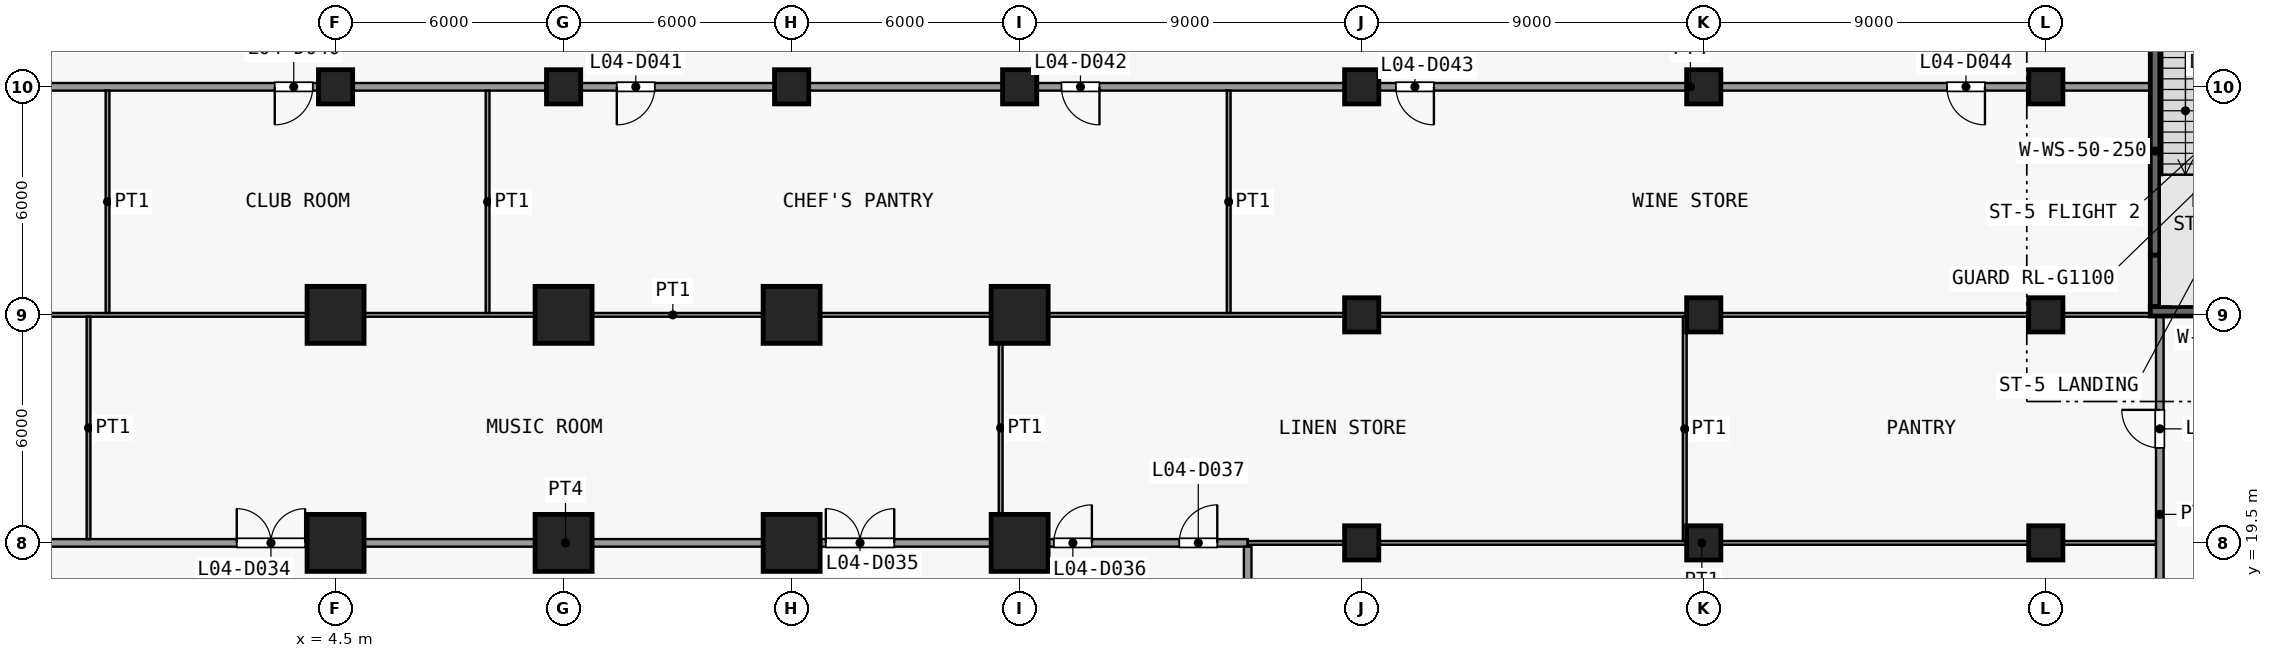
"""IFC4 building model, lengths in metres.
Left out: names, types, materials, properties, quantities, classifications, styles, units other than length and angle.
Written with IfcOpenShell. Run it as: python <this file> out.ifc"""

import sys

from ifc_helpers import new_model, si_unit, direction, frame, frame_2d, origin, origin_2d, place, context, subcontext, project, spatial, rectangle, extrude, element, fill, save


model = new_model("IFC4")
c1 = context("Model", 3, precision=1e-05, world=origin(), true_north=direction((0.0, 1.0)))
c2 = subcontext(c1, "Body", "Model", "MODEL_VIEW")
j1 = project(units=[si_unit("LENGTHUNIT", "METRE"), si_unit("PLANEANGLEUNIT", "RADIAN")], contexts=[c1])
p1 = place(None, origin())
s1 = spatial("IfcSite", under=j1, at=p1, CompositionType="ELEMENT")
p2 = place(p1, origin())
s2 = spatial("IfcBuilding", under=s1, at=p2, CompositionType="ELEMENT")
p3 = place(p2, frame((0.0, 0.0, 23.5)))
s3 = spatial("IfcBuildingStorey", under=s2, at=p3, CompositionType="ELEMENT", Elevation=23.5)
for number, where, z_axis, x_axis in (
    (1, (4.5, 19.5, 0.0), (0.0, 0.0, 1.0), (1.0, 0.0, 0.0)),
    (2, (4.5, 25.5, 0.0), (0.0, 0.0, 1.0), (1.0, 0.0, 0.0)),
):
    element("IfcColumn", number, at=place(p3, frame(where, z_axis=z_axis, x_axis=x_axis)), inside=s3, PredefinedType="COLUMN", context=c2, shape_type="SweptSolid", body=[
        extrude(rectangle(XDim=1.5, YDim=1.5, at=origin_2d()), origin(), (0.0, 0.0, 1.0), 4.5),
    ])
p4 = place(p3, frame((4.5, 31.5, 0.0), z_axis=(0.0, 0.0, 1.0), x_axis=(1.0, 0.0, 0.0)))
e3 = element("IfcColumn", 3, at=p4, inside=s3, PredefinedType="COLUMN", context=c2, shape_type="SweptSolid", body=[
    extrude(rectangle(XDim=0.9, YDim=0.9, at=origin_2d()), origin(), (0.0, 0.0, 1.0), 4.5),
])
for number, where, z_axis, x_axis in (
    (4, (10.5, 19.5, 0.0), (0.0, 0.0, 1.0), (1.0, 0.0, 0.0)),
    (5, (10.5, 25.5, 0.0), (0.0, 0.0, 1.0), (1.0, 0.0, 0.0)),
):
    element("IfcColumn", number, at=place(p3, frame(where, z_axis=z_axis, x_axis=x_axis)), inside=s3, PredefinedType="COLUMN", context=c2, shape_type="SweptSolid", body=[
        extrude(rectangle(XDim=1.5, YDim=1.5, at=origin_2d()), origin(), (0.0, 0.0, 1.0), 4.5),
    ])
p5 = place(p3, frame((10.5, 31.5, 0.0), z_axis=(0.0, 0.0, 1.0), x_axis=(1.0, 0.0, 0.0)))
e6 = element("IfcColumn", 6, at=p5, inside=s3, PredefinedType="COLUMN", context=c2, shape_type="SweptSolid", body=[
    extrude(rectangle(XDim=0.9, YDim=0.9, at=origin_2d()), origin(), (0.0, 0.0, 1.0), 4.5),
])
for number, where, z_axis, x_axis in (
    (7, (16.5, 19.5, 0.0), (0.0, 0.0, 1.0), (1.0, 0.0, 0.0)),
    (8, (16.5, 25.5, 0.0), (0.0, 0.0, 1.0), (1.0, 0.0, 0.0)),
):
    element("IfcColumn", number, at=place(p3, frame(where, z_axis=z_axis, x_axis=x_axis)), inside=s3, PredefinedType="COLUMN", context=c2, shape_type="SweptSolid", body=[
        extrude(rectangle(XDim=1.5, YDim=1.5, at=origin_2d()), origin(), (0.0, 0.0, 1.0), 4.5),
    ])
p6 = place(p3, frame((16.5, 31.5, 0.0), z_axis=(0.0, 0.0, 1.0), x_axis=(1.0, 0.0, 0.0)))
e9 = element("IfcColumn", 9, at=p6, inside=s3, PredefinedType="COLUMN", context=c2, shape_type="SweptSolid", body=[
    extrude(rectangle(XDim=0.9, YDim=0.9, at=origin_2d()), origin(), (0.0, 0.0, 1.0), 4.5),
])
for number, where, z_axis, x_axis in (
    (10, (22.5, 19.5, 0.0), (0.0, 0.0, 1.0), (1.0, 0.0, 0.0)),
    (11, (22.5, 25.5, 0.0), (0.0, 0.0, 1.0), (1.0, 0.0, 0.0)),
):
    element("IfcColumn", number, at=place(p3, frame(where, z_axis=z_axis, x_axis=x_axis)), inside=s3, PredefinedType="COLUMN", context=c2, shape_type="SweptSolid", body=[
        extrude(rectangle(XDim=1.5, YDim=1.5, at=origin_2d()), origin(), (0.0, 0.0, 1.0), 4.5),
    ])
for number, where, z_axis, x_axis in (
    (12, (22.5, 31.5, 0.0), (0.0, 0.0, 1.0), (1.0, 0.0, 0.0)),
    (13, (31.5, 19.5, 0.0), (0.0, 0.0, 1.0), (1.0, 0.0, 0.0)),
    (14, (31.5, 25.5, 0.0), (0.0, 0.0, 1.0), (1.0, 0.0, 0.0)),
    (15, (31.5, 31.5, 0.0), (0.0, 0.0, 1.0), (1.0, 0.0, 0.0)),
    (16, (40.5, 19.5, 0.0), (0.0, 0.0, 1.0), (1.0, 0.0, 0.0)),
    (17, (40.5, 25.5, 0.0), (0.0, 0.0, 1.0), (1.0, 0.0, 0.0)),
    (18, (40.5, 31.5, 0.0), (0.0, 0.0, 1.0), (1.0, 0.0, 0.0)),
    (19, (49.5, 19.5, 0.0), (0.0, 0.0, 1.0), (1.0, 0.0, 0.0)),
    (20, (49.5, 25.5, 0.0), (0.0, 0.0, 1.0), (1.0, 0.0, 0.0)),
    (21, (49.5, 31.5, 0.0), (0.0, 0.0, 1.0), (1.0, 0.0, 0.0)),
):
    element("IfcColumn", number, at=place(p3, frame(where, z_axis=z_axis, x_axis=x_axis)), inside=s3, PredefinedType="COLUMN", context=c2, shape_type="SweptSolid", body=[
        extrude(rectangle(XDim=0.9, YDim=0.9, at=origin_2d()), origin(), (0.0, 0.0, 1.0), 4.5),
    ])
p7 = place(p3, frame((52.375, 27.07, 0.0), z_axis=(0.0, 0.0, 1.0), x_axis=(0.0, 1.0, 0.0)))
e22 = element("IfcWall", 22, at=p7, inside=s3, PredefinedType="SHEAR", context=c2, shape_type="SweptSolid", body=[
    extrude(rectangle(XDim=5.48, YDim=0.25, at=frame_2d((2.74, 0.0))), origin(), (0.0, 0.0, 1.0), 4.15),
])
p8 = place(p3, frame((52.375, 25.72, 0.0), z_axis=(0.0, 0.0, 1.0), x_axis=(0.0, 1.0, 0.0)))
e23 = element("IfcWall", 23, at=p8, inside=s3, PredefinedType="SHEAR", context=c2, shape_type="SweptSolid", body=[
    extrude(rectangle(XDim=1.35, YDim=0.25, at=frame_2d((0.675, 0.0))), origin(), (0.0, 0.0, 1.0), 4.15),
])
p9 = place(p3, frame((52.25, 25.595, 0.0), z_axis=(0.0, 0.0, 1.0), x_axis=(1.0, 0.0, 0.0)))
e24 = element("IfcWall", 24, at=p9, inside=s3, PredefinedType="SHEAR", context=c2, shape_type="SweptSolid", body=[
    extrude(rectangle(XDim=3.35, YDim=0.25, at=frame_2d((1.675, 0.0))), origin(), (0.0, 0.0, 1.0), 4.15),
])
p10 = place(p3, frame((-31.6, 19.5, 0.0), z_axis=(0.0, 0.0, 1.0), x_axis=(1.0, 0.0, 0.0)))
e25 = element("IfcWall", 25, at=p10, inside=s3, PredefinedType="PARTITIONING", context=c2, shape_type="SweptSolid", body=[
    extrude(rectangle(XDim=60.1, YDim=0.2, at=frame_2d((30.05, 0.0))), origin(), (0.0, 0.0, 1.0), 4.15),
])
p11 = place(p10, frame((7.2, 0.0, 0.0)))
e26 = element("IfcOpeningElement", 26, at=p11, cuts=e25, PredefinedType="OPENING", context=c2, shape_type="SweptSolid", body=[
    extrude(rectangle(XDim=1.0, YDim=2.1, at=frame_2d((0.5, 1.05))), frame((0.0, 0.11, 0.0), z_axis=(0.0, -1.0, 0.0), x_axis=(1.0, 0.0, 0.0)), (0.0, 0.0, 1.0), 0.22),
])
p12 = place(p10, frame((13.2, 0.0, 0.0)))
e27 = element("IfcOpeningElement", 27, at=p12, cuts=e25, PredefinedType="OPENING", context=c2, shape_type="SweptSolid", body=[
    extrude(rectangle(XDim=1.0, YDim=2.1, at=frame_2d((0.5, 1.05))), frame((0.0, 0.11, 0.0), z_axis=(0.0, -1.0, 0.0), x_axis=(1.0, 0.0, 0.0)), (0.0, 0.0, 1.0), 0.22),
])
p13 = place(p10, frame((25.2, 0.0, 0.0)))
e28 = element("IfcOpeningElement", 28, at=p13, cuts=e25, PredefinedType="OPENING", context=c2, shape_type="SweptSolid", body=[
    extrude(rectangle(XDim=1.0, YDim=2.1, at=frame_2d((0.5, 1.05))), frame((0.0, 0.11, 0.0), z_axis=(0.0, -1.0, 0.0), x_axis=(1.0, 0.0, 0.0)), (0.0, 0.0, 1.0), 0.22),
])
p14 = place(p10, frame((33.5, 0.0, 0.0)))
e29 = element("IfcOpeningElement", 29, at=p14, cuts=e25, PredefinedType="OPENING", context=c2, shape_type="SweptSolid", body=[
    extrude(rectangle(XDim=1.8, YDim=2.1, at=frame_2d((0.9, 1.05))), frame((0.0, 0.11, 0.0), z_axis=(0.0, -1.0, 0.0), x_axis=(1.0, 0.0, 0.0)), (0.0, 0.0, 1.0), 0.22),
])
p15 = place(p10, frame((49.0, 0.0, 0.0)))
e30 = element("IfcOpeningElement", 30, at=p15, cuts=e25, PredefinedType="OPENING", context=c2, shape_type="SweptSolid", body=[
    extrude(rectangle(XDim=1.8, YDim=2.1, at=frame_2d((0.9, 1.05))), frame((0.0, 0.11, 0.0), z_axis=(0.0, -1.0, 0.0), x_axis=(1.0, 0.0, 0.0)), (0.0, 0.0, 1.0), 0.22),
])
p16 = place(p10, frame((55.0, 0.0, 0.0)))
e31 = element("IfcOpeningElement", 31, at=p16, cuts=e25, PredefinedType="OPENING", context=c2, shape_type="SweptSolid", body=[
    extrude(rectangle(XDim=1.0, YDim=2.1, at=frame_2d((0.5, 1.05))), frame((0.0, 0.11, 0.0), z_axis=(0.0, -1.0, 0.0), x_axis=(1.0, 0.0, 0.0)), (0.0, 0.0, 1.0), 0.22),
])
p17 = place(p10, frame((58.3, 0.0, 0.0)))
e32 = element("IfcOpeningElement", 32, at=p17, cuts=e25, PredefinedType="OPENING", context=c2, shape_type="SweptSolid", body=[
    extrude(rectangle(XDim=1.0, YDim=2.1, at=frame_2d((0.5, 1.05))), frame((0.0, 0.11, 0.0), z_axis=(0.0, -1.0, 0.0), x_axis=(1.0, 0.0, 0.0)), (0.0, 0.0, 1.0), 0.22),
])
p18 = place(p3, frame((28.5, 19.5, 0.0), z_axis=(0.0, 0.0, 1.0), x_axis=(1.0, 0.0, 0.0)))
e33 = element("IfcWall", 33, at=p18, inside=s3, PredefinedType="PARTITIONING", context=c2, shape_type="SweptSolid", body=[
    extrude(rectangle(XDim=23.9, YDim=0.1, at=frame_2d((11.95, 0.0))), origin(), (0.0, 0.0, 1.0), 4.15),
])
p19 = place(p3, frame((-25.5, 25.5, 0.0), z_axis=(0.0, 0.0, 1.0), x_axis=(1.0, 0.0, 0.0)))
e34 = element("IfcWall", 34, at=p19, inside=s3, PredefinedType="PARTITIONING", context=c2, shape_type="SweptSolid", body=[
    extrude(rectangle(XDim=77.75, YDim=0.1, at=frame_2d((38.875, 0.0))), origin(), (0.0, 0.0, 1.0), 4.15),
])
p20 = place(p3, frame((-25.9, 31.5, 0.0), z_axis=(0.0, 0.0, 1.0), x_axis=(1.0, 0.0, 0.0)))
e35 = element("IfcWall", 35, at=p20, inside=s3, PredefinedType="PARTITIONING", context=c2, shape_type="SweptSolid", body=[
    extrude(rectangle(XDim=78.15, YDim=0.2, at=frame_2d((39.075, 0.0))), origin(), (0.0, 0.0, 1.0), 4.15),
])
p21 = place(p20, frame((4.0, 0.0, 0.0)))
e36 = element("IfcOpeningElement", 36, at=p21, cuts=e35, PredefinedType="OPENING", context=c2, shape_type="SweptSolid", body=[
    extrude(rectangle(XDim=1.8, YDim=2.1, at=frame_2d((0.9, 1.05))), frame((0.0, 0.11, 0.0), z_axis=(0.0, -1.0, 0.0), x_axis=(1.0, 0.0, 0.0)), (0.0, 0.0, 1.0), 0.22),
])
p22 = place(p20, frame((18.6, 0.0, 0.0)))
e37 = element("IfcOpeningElement", 37, at=p22, cuts=e35, PredefinedType="OPENING", context=c2, shape_type="SweptSolid", body=[
    extrude(rectangle(XDim=1.8, YDim=2.1, at=frame_2d((0.9, 1.05))), frame((0.0, 0.11, 0.0), z_axis=(0.0, -1.0, 0.0), x_axis=(1.0, 0.0, 0.0)), (0.0, 0.0, 1.0), 0.22),
])
p23 = place(p20, frame((28.8, 0.0, 0.0)))
e38 = element("IfcOpeningElement", 38, at=p23, cuts=e35, PredefinedType="OPENING", context=c2, shape_type="SweptSolid", body=[
    extrude(rectangle(XDim=1.0, YDim=2.1, at=frame_2d((0.5, 1.05))), frame((0.0, 0.11, 0.0), z_axis=(0.0, -1.0, 0.0), x_axis=(1.0, 0.0, 0.0)), (0.0, 0.0, 1.0), 0.22),
])
p24 = place(p20, frame((37.8, 0.0, 0.0)))
e39 = element("IfcOpeningElement", 39, at=p24, cuts=e35, PredefinedType="OPENING", context=c2, shape_type="SweptSolid", body=[
    extrude(rectangle(XDim=1.0, YDim=2.1, at=frame_2d((0.5, 1.05))), frame((0.0, 0.11, 0.0), z_axis=(0.0, -1.0, 0.0), x_axis=(1.0, 0.0, 0.0)), (0.0, 0.0, 1.0), 0.22),
])
p25 = place(p20, frame((49.5, 0.0, 0.0)))
e40 = element("IfcOpeningElement", 40, at=p25, cuts=e35, PredefinedType="OPENING", context=c2, shape_type="SweptSolid", body=[
    extrude(rectangle(XDim=1.0, YDim=2.1, at=frame_2d((0.5, 1.05))), frame((0.0, 0.11, 0.0), z_axis=(0.0, -1.0, 0.0), x_axis=(1.0, 0.0, 0.0)), (0.0, 0.0, 1.0), 0.22),
])
p26 = place(p20, frame((58.3, 0.0, 0.0)))
e41 = element("IfcOpeningElement", 41, at=p26, cuts=e35, PredefinedType="OPENING", context=c2, shape_type="SweptSolid", body=[
    extrude(rectangle(XDim=1.0, YDim=2.1, at=frame_2d((0.5, 1.05))), frame((0.0, 0.11, 0.0), z_axis=(0.0, -1.0, 0.0), x_axis=(1.0, 0.0, 0.0)), (0.0, 0.0, 1.0), 0.22),
])
p27 = place(p20, frame((72.8, 0.0, 0.0)))
e42 = element("IfcOpeningElement", 42, at=p27, cuts=e35, PredefinedType="OPENING", context=c2, shape_type="SweptSolid", body=[
    extrude(rectangle(XDim=1.0, YDim=2.1, at=frame_2d((0.5, 1.05))), frame((0.0, 0.11, 0.0), z_axis=(0.0, -1.0, 0.0), x_axis=(1.0, 0.0, 0.0)), (0.0, 0.0, 1.0), 0.22),
])
for number, where, z_axis, x_axis in (
    (43, (-2.0, 19.6, 0.0), (0.0, 0.0, 1.0), (0.0, 1.0, 0.0)),
    (44, (-1.5, 25.55, 0.0), (0.0, 0.0, 1.0), (0.0, 1.0, 0.0)),
    (45, (8.5, 25.55, 0.0), (0.0, 0.0, 1.0), (0.0, 1.0, 0.0)),
    (46, (22.0, 19.6, 0.0), (0.0, 0.0, 1.0), (0.0, 1.0, 0.0)),
    (47, (28.0, 25.55, 0.0), (0.0, 0.0, 1.0), (0.0, 1.0, 0.0)),
):
    element("IfcWall", number, at=place(p3, frame(where, z_axis=z_axis, x_axis=x_axis)), inside=s3, PredefinedType="PARTITIONING", context=c2, shape_type="SweptSolid", body=[
        extrude(rectangle(XDim=5.85, YDim=0.1, at=frame_2d((2.925, 0.0))), origin(), (0.0, 0.0, 1.0), 4.15),
    ])
p28 = place(p3, frame((28.5, 16.6, 0.0), z_axis=(0.0, 0.0, 1.0), x_axis=(0.0, 1.0, 0.0)))
e48 = element("IfcWall", 48, at=p28, inside=s3, PredefinedType="PARTITIONING", context=c2, shape_type="SweptSolid", body=[
    extrude(rectangle(XDim=2.8, YDim=0.2, at=frame_2d((1.4, 0.0))), origin(), (0.0, 0.0, 1.0), 4.15),
])
p29 = place(p3, frame((40.0, 19.55, 0.0), z_axis=(0.0, 0.0, 1.0), x_axis=(0.0, 1.0, 0.0)))
e49 = element("IfcWall", 49, at=p29, inside=s3, PredefinedType="PARTITIONING", context=c2, shape_type="SweptSolid", body=[
    extrude(rectangle(XDim=5.9, YDim=0.1, at=frame_2d((2.95, 0.0))), origin(), (0.0, 0.0, 1.0), 4.15),
])
p30 = place(p3, frame((52.5, 16.6, 0.0), z_axis=(0.0, 0.0, 1.0), x_axis=(0.0, 1.0, 0.0)))
e50 = element("IfcWall", 50, at=p30, inside=s3, PredefinedType="PARTITIONING", context=c2, shape_type="SweptSolid", body=[
    extrude(rectangle(XDim=8.87, YDim=0.2, at=frame_2d((4.435, 0.0))), origin(), (0.0, 0.0, 1.0), 4.15),
])
p31 = place(p30, frame((0.9, 0.0, 0.0)))
e51 = element("IfcOpeningElement", 51, at=p31, cuts=e50, PredefinedType="OPENING", context=c2, shape_type="SweptSolid", body=[
    extrude(rectangle(XDim=1.0, YDim=2.1, at=frame_2d((0.5, 1.05))), frame((0.0, 0.11, 0.0), z_axis=(0.0, -1.0, 0.0), x_axis=(1.0, 0.0, 0.0)), (0.0, 0.0, 1.0), 0.22),
])
p32 = place(p30, frame((5.4, 0.0, 0.0)))
e52 = element("IfcOpeningElement", 52, at=p32, cuts=e50, PredefinedType="OPENING", context=c2, shape_type="SweptSolid", body=[
    extrude(rectangle(XDim=1.0, YDim=2.1, at=frame_2d((0.5, 1.05))), frame((0.0, 0.11, 0.0), z_axis=(0.0, -1.0, 0.0), x_axis=(1.0, 0.0, 0.0)), (0.0, 0.0, 1.0), 0.22),
])
p33 = place(p14, origin())
e53 = element("IfcDoor", 53, at=p33, inside=s3, OperationType="DOUBLE_DOOR_SINGLE_SWING", PredefinedType="DOOR", context=c2, shape_type="SweptSolid", body=[
    extrude(rectangle(XDim=1.8, YDim=2.1, at=frame_2d((0.9, 1.05))), frame((0.0, 0.025, 0.0), z_axis=(0.0, -1.0, 0.0), x_axis=(1.0, 0.0, 0.0)), (0.0, 0.0, 1.0), 0.05),
])
fill(e29, e53)
p34 = place(p15, origin())
e54 = element("IfcDoor", 54, at=p34, inside=s3, OperationType="DOUBLE_DOOR_SINGLE_SWING", PredefinedType="DOOR", context=c2, shape_type="SweptSolid", body=[
    extrude(rectangle(XDim=1.8, YDim=2.1, at=frame_2d((0.9, 1.05))), frame((0.0, 0.025, 0.0), z_axis=(0.0, -1.0, 0.0), x_axis=(1.0, 0.0, 0.0)), (0.0, 0.0, 1.0), 0.05),
])
fill(e30, e54)
p35 = place(p16, origin())
e55 = element("IfcDoor", 55, at=p35, inside=s3, OperationType="SINGLE_SWING_LEFT", PredefinedType="DOOR", context=c2, shape_type="SweptSolid", body=[
    extrude(rectangle(XDim=1.0, YDim=2.1, at=frame_2d((0.5, 1.05))), frame((0.0, 0.025, 0.0), z_axis=(0.0, -1.0, 0.0), x_axis=(1.0, 0.0, 0.0)), (0.0, 0.0, 1.0), 0.05),
])
fill(e31, e55)
p36 = place(p17, origin())
e56 = element("IfcDoor", 56, at=p36, inside=s3, OperationType="SINGLE_SWING_LEFT", PredefinedType="DOOR", context=c2, shape_type="SweptSolid", body=[
    extrude(rectangle(XDim=1.0, YDim=2.1, at=frame_2d((0.5, 1.05))), frame((0.0, 0.025, 0.0), z_axis=(0.0, -1.0, 0.0), x_axis=(1.0, 0.0, 0.0)), (0.0, 0.0, 1.0), 0.05),
])
fill(e32, e56)
p37 = place(p23, origin())
e57 = element("IfcDoor", 57, at=p37, inside=s3, OperationType="SINGLE_SWING_LEFT", PredefinedType="DOOR", context=c2, shape_type="SweptSolid", body=[
    extrude(rectangle(XDim=1.0, YDim=2.1, at=frame_2d((0.5, 1.05))), frame((0.0, 0.025, 0.0), z_axis=(0.0, -1.0, 0.0), x_axis=(1.0, 0.0, 0.0)), (0.0, 0.0, 1.0), 0.05),
])
fill(e38, e57)
p38 = place(p24, origin())
e58 = element("IfcDoor", 58, at=p38, inside=s3, OperationType="SINGLE_SWING_LEFT", PredefinedType="DOOR", context=c2, shape_type="SweptSolid", body=[
    extrude(rectangle(XDim=1.0, YDim=2.1, at=frame_2d((0.5, 1.05))), frame((0.0, 0.025, 0.0), z_axis=(0.0, -1.0, 0.0), x_axis=(1.0, 0.0, 0.0)), (0.0, 0.0, 1.0), 0.05),
])
fill(e39, e58)
p39 = place(p25, origin())
e59 = element("IfcDoor", 59, at=p39, inside=s3, OperationType="SINGLE_SWING_RIGHT", PredefinedType="DOOR", context=c2, shape_type="SweptSolid", body=[
    extrude(rectangle(XDim=1.0, YDim=2.1, at=frame_2d((0.5, 1.05))), frame((0.0, 0.025, 0.0), z_axis=(0.0, -1.0, 0.0), x_axis=(1.0, 0.0, 0.0)), (0.0, 0.0, 1.0), 0.05),
])
fill(e40, e59)
p40 = place(p26, origin())
e60 = element("IfcDoor", 60, at=p40, inside=s3, OperationType="SINGLE_SWING_RIGHT", PredefinedType="DOOR", context=c2, shape_type="SweptSolid", body=[
    extrude(rectangle(XDim=1.0, YDim=2.1, at=frame_2d((0.5, 1.05))), frame((0.0, 0.025, 0.0), z_axis=(0.0, -1.0, 0.0), x_axis=(1.0, 0.0, 0.0)), (0.0, 0.0, 1.0), 0.05),
])
fill(e41, e60)
p41 = place(p27, origin())
e61 = element("IfcDoor", 61, at=p41, inside=s3, OperationType="SINGLE_SWING_RIGHT", PredefinedType="DOOR", context=c2, shape_type="SweptSolid", body=[
    extrude(rectangle(XDim=1.0, YDim=2.1, at=frame_2d((0.5, 1.05))), frame((0.0, 0.025, 0.0), z_axis=(0.0, -1.0, 0.0), x_axis=(1.0, 0.0, 0.0)), (0.0, 0.0, 1.0), 0.05),
])
fill(e42, e61)
p42 = place(p32, origin())
e62 = element("IfcDoor", 62, at=p42, inside=s3, OperationType="SINGLE_SWING_LEFT", PredefinedType="DOOR", context=c2, shape_type="SweptSolid", body=[
    extrude(rectangle(XDim=1.0, YDim=2.1, at=frame_2d((0.5, 1.05))), frame((0.0, 0.025, 0.0), z_axis=(0.0, -1.0, 0.0), x_axis=(1.0, 0.0, 0.0)), (0.0, 0.0, 1.0), 0.05),
])
fill(e52, e62)
save(model, sys.argv[1])
